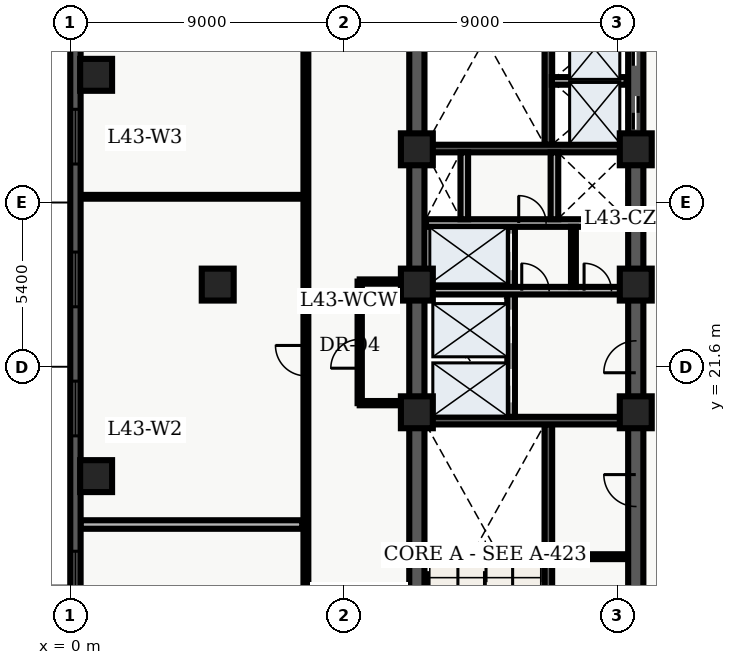
"""IFC4 building model, lengths in metres.
Left out: names, types, materials, properties, quantities, classifications, styles, units other than length and angle.
Written with IfcOpenShell. Run it as: python <this file> out.ifc"""

import sys

from ifc_helpers import new_model, entity, si_unit, converted_unit, direction, frame, origin_with_axes, origin_2d_with_axis, place, context, subcontext, project, spatial, polyline, rectangle, outline, extrude, element, fill, save


model = new_model("IFC4")
c1 = context("Model", 3, precision=1e-05, world=origin_with_axes(), true_north=direction((0.0, 1.0)))
c2 = subcontext(c1, "Body", "Model", "MODEL_VIEW")
j1 = project(units=[si_unit("LENGTHUNIT", "METRE"), converted_unit("PLANEANGLEUNIT", "DEGREE", entity("IfcPlaneAngleMeasure", 0.017), si_unit("PLANEANGLEUNIT", "RADIAN"), dimensions=[0, 0, 0, 0, 0, 0, 0])], contexts=[c1])
p1 = place(None, origin_with_axes())
s1 = spatial("IfcSite", under=j1, at=p1, CompositionType="ELEMENT")
p2 = place(p1, origin_with_axes())
s2 = spatial("IfcBuilding", under=s1, at=p2, CompositionType="ELEMENT")
p3 = place(p2, frame((0.0, 0.0, 175.8), z_axis=(0.0, 0.0, 1.0), x_axis=(1.0, 0.0, 0.0)))
s3 = spatial("IfcBuildingStorey", under=s2, at=p3, CompositionType="ELEMENT", Elevation=175.8)
p4 = place(p3, frame((11.4, 10.8, 0.0), z_axis=(0.0, 0.0, 1.0), x_axis=(0.0, 1.0, 0.0)))
e1 = element("IfcWall", 1, at=p4, inside=s3, PredefinedType="SHEAR", context=c2, shape_type="SweptSolid", body=[
    extrude(outline(polyline([(0.0, -0.25), (27.0, -0.25), (27.0, 0.25), (0.0, 0.25), (0.0, -0.25)])), origin_with_axes(), (0.0, 0.0, 1.0), 3.66),
])
p5 = place(p3, frame((18.6, 10.8, 0.0), z_axis=(0.0, 0.0, 1.0), x_axis=(0.0, 1.0, 0.0)))
e2 = element("IfcWall", 2, at=p5, inside=s3, PredefinedType="SHEAR", context=c2, shape_type="SweptSolid", body=[
    extrude(outline(polyline([(0.0, -0.25), (13.5, -0.25), (13.5, 0.25), (0.0, 0.25), (0.0, -0.25)])), origin_with_axes(), (0.0, 0.0, 1.0), 3.66),
])
p6 = place(p5, frame((11.125, 0.0, 0.0), z_axis=(0.0, 0.0, 1.0), x_axis=(1.0, 0.0, 0.0)))
e3 = element("IfcOpeningElement", 3, at=p6, cuts=e2, PredefinedType="OPENING", context=c2, shape_type="SweptSolid", body=[
    extrude(rectangle(XDim=1.05, YDim=0.52, at=origin_2d_with_axis()), origin_with_axes(), (0.0, 0.0, 1.0), 2.15),
])
p7 = place(p5, frame((2.425, 0.0, 0.0), z_axis=(0.0, 0.0, 1.0), x_axis=(1.0, 0.0, 0.0)))
e4 = element("IfcOpeningElement", 4, at=p7, cuts=e2, PredefinedType="OPENING", context=c2, shape_type="SweptSolid", body=[
    extrude(rectangle(XDim=1.05, YDim=0.52, at=origin_2d_with_axis()), origin_with_axes(), (0.0, 0.0, 1.0), 2.15),
])
p8 = place(p5, frame((6.725, 0.0, 0.0), z_axis=(0.0, 0.0, 1.0), x_axis=(1.0, 0.0, 0.0)))
e5 = element("IfcOpeningElement", 5, at=p8, cuts=e2, PredefinedType="OPENING", context=c2, shape_type="SweptSolid", body=[
    extrude(rectangle(XDim=1.05, YDim=0.52, at=origin_2d_with_axis()), origin_with_axes(), (0.0, 0.0, 1.0), 2.15),
])
p9 = place(p3, frame((18.6, 24.3, 0.0), z_axis=(0.0, 0.0, 1.0), x_axis=(0.0, 1.0, 0.0)))
e6 = element("IfcWall", 6, at=p9, inside=s3, PredefinedType="SHEAR", context=c2, shape_type="SweptSolid", body=[
    extrude(outline(polyline([(0.0, -0.25), (13.5, -0.25), (13.5, 0.25), (0.0, 0.25), (0.0, -0.25)])), origin_with_axes(), (0.0, 0.0, 1.0), 3.66),
])
p10 = place(p9, frame((5.65, 0.0, 0.0), z_axis=(0.0, 0.0, 1.0), x_axis=(1.0, 0.0, 0.0)))
e7 = element("IfcOpeningElement", 7, at=p10, cuts=e6, PredefinedType="OPENING", context=c2, shape_type="SweptSolid", body=[
    extrude(rectangle(XDim=1.1, YDim=0.52, at=origin_2d_with_axis()), origin_with_axes(), (0.0, 0.0, 1.0), 2.15),
])
p11 = place(p9, frame((7.75, 0.0, 0.0), z_axis=(0.0, 0.0, 1.0), x_axis=(1.0, 0.0, 0.0)))
e8 = element("IfcOpeningElement", 8, at=p11, cuts=e6, PredefinedType="OPENING", context=c2, shape_type="SweptSolid", body=[
    extrude(rectangle(XDim=1.1, YDim=0.52, at=origin_2d_with_axis()), origin_with_axes(), (0.0, 0.0, 1.0), 2.15),
])
p12 = place(p3, frame((15.725, 11.05, 0.0), z_axis=(0.0, 0.0, 1.0), x_axis=(0.0, 1.0, 0.0)))
e9 = element("IfcWall", 9, at=p12, inside=s3, PredefinedType="SHEAR", context=c2, shape_type="SweptSolid", body=[
    extrude(outline(polyline([(0.0, -0.125), (8.65, -0.125), (8.65, 0.125), (0.0, 0.125), (0.0, -0.125)])), origin_with_axes(), (0.0, 0.0, 1.0), 3.66),
])
p13 = place(p3, frame((11.65, 19.825, 0.0), z_axis=(0.0, 0.0, 1.0), x_axis=(1.0, 0.0, 0.0)))
e10 = element("IfcWall", 10, at=p13, inside=s3, PredefinedType="SHEAR", context=c2, shape_type="SweptSolid", body=[
    extrude(outline(polyline([(0.0, -0.125), (6.7, -0.125), (6.7, 0.125), (0.0, 0.125), (0.0, -0.125)])), origin_with_axes(), (0.0, 0.0, 1.0), 3.66),
])
p14 = place(p3, frame((15.725, 28.9, 0.0), z_axis=(0.0, 0.0, 1.0), x_axis=(0.0, 1.0, 0.0)))
e11 = element("IfcWall", 11, at=p14, inside=s3, PredefinedType="SHEAR", context=c2, shape_type="SweptSolid", body=[
    extrude(outline(polyline([(0.0, -0.125), (8.65, -0.125), (8.65, 0.125), (0.0, 0.125), (0.0, -0.125)])), origin_with_axes(), (0.0, 0.0, 1.0), 3.66),
])
p15 = place(p3, frame((11.65, 28.775, 0.0), z_axis=(0.0, 0.0, 1.0), x_axis=(1.0, 0.0, 0.0)))
e12 = element("IfcWall", 12, at=p15, inside=s3, PredefinedType="SHEAR", context=c2, shape_type="SweptSolid", body=[
    extrude(outline(polyline([(0.0, -0.125), (6.7, -0.125), (6.7, 0.125), (0.0, 0.125), (0.0, -0.125)])), origin_with_axes(), (0.0, 0.0, 1.0), 3.66),
])
p16 = place(p3, frame((14.5, 19.95, 0.0), z_axis=(0.0, 0.0, 1.0), x_axis=(0.0, 1.0, 0.0)))
e13 = element("IfcWall", 13, at=p16, inside=s3, PredefinedType="SOLIDWALL", context=c2, shape_type="SweptSolid", body=[
    extrude(outline(polyline([(0.0, -0.125), (6.25, -0.125), (6.25, 0.125), (0.0, 0.125), (0.0, -0.125)])), origin_with_axes(), (0.0, 0.0, 1.0), 2.7),
])
p17 = place(p16, frame((1.025, 0.0, 0.0), z_axis=(0.0, 0.0, 1.0), x_axis=(1.0, 0.0, 0.0)))
e14 = element("IfcOpeningElement", 14, at=p17, cuts=e13, PredefinedType="OPENING", context=c2, shape_type="SweptSolid", body=[
    extrude(rectangle(XDim=1.1, YDim=0.27, at=origin_2d_with_axis()), origin_with_axes(), (0.0, 0.0, 1.0), 2.15),
])
p18 = place(p16, frame((2.975, 0.0, 0.0), z_axis=(0.0, 0.0, 1.0), x_axis=(1.0, 0.0, 0.0)))
e15 = element("IfcOpeningElement", 15, at=p18, cuts=e13, PredefinedType="OPENING", context=c2, shape_type="SweptSolid", body=[
    extrude(rectangle(XDim=1.1, YDim=0.27, at=origin_2d_with_axis()), origin_with_axes(), (0.0, 0.0, 1.0), 2.15),
])
p19 = place(p16, frame((5.425, 0.0, 0.0), z_axis=(0.0, 0.0, 1.0), x_axis=(1.0, 0.0, 0.0)))
e16 = element("IfcOpeningElement", 16, at=p19, cuts=e13, PredefinedType="OPENING", context=c2, shape_type="SweptSolid", body=[
    extrude(rectangle(XDim=1.2, YDim=0.27, at=origin_2d_with_axis()), origin_with_axes(), (0.0, 0.0, 1.0), 2.15),
])
p20 = place(p3, frame((11.7, 24.1, 0.0), z_axis=(0.0, 0.0, 1.0), x_axis=(1.0, 0.0, 0.0)))
e17 = element("IfcWall", 17, at=p20, inside=s3, PredefinedType="SOLIDWALL", context=c2, shape_type="SweptSolid", body=[
    extrude(outline(polyline([(0.0, -0.125), (6.6, -0.125), (6.6, 0.125), (0.0, 0.125), (0.0, -0.125)])), origin_with_axes(), (0.0, 0.0, 1.0), 2.7),
])
p21 = place(p20, frame((3.6, 0.0, 0.0), z_axis=(0.0, 0.0, 1.0), x_axis=(1.0, 0.0, 0.0)))
e18 = element("IfcOpeningElement", 18, at=p21, cuts=e17, PredefinedType="OPENING", context=c2, shape_type="SweptSolid", body=[
    extrude(rectangle(XDim=0.9, YDim=0.27, at=origin_2d_with_axis()), origin_with_axes(), (0.0, 0.0, 1.0), 2.15),
])
p22 = place(p20, frame((5.65, 0.0, 0.0), z_axis=(0.0, 0.0, 1.0), x_axis=(1.0, 0.0, 0.0)))
e19 = element("IfcOpeningElement", 19, at=p22, cuts=e17, PredefinedType="OPENING", context=c2, shape_type="SweptSolid", body=[
    extrude(rectangle(XDim=0.9, YDim=0.27, at=origin_2d_with_axis()), origin_with_axes(), (0.0, 0.0, 1.0), 2.15),
])
p23 = place(p3, frame((11.7, 26.325, 0.0), z_axis=(0.0, 0.0, 1.0), x_axis=(1.0, 0.0, 0.0)))
e20 = element("IfcWall", 20, at=p23, inside=s3, PredefinedType="SOLIDWALL", context=c2, shape_type="SweptSolid", body=[
    extrude(outline(polyline([(0.0, -0.125), (6.6, -0.125), (6.6, 0.125), (0.0, 0.125), (0.0, -0.125)])), origin_with_axes(), (0.0, 0.0, 1.0), 2.7),
])
p24 = place(p23, frame((3.5, 0.0, 0.0), z_axis=(0.0, 0.0, 1.0), x_axis=(1.0, 0.0, 0.0)))
e21 = element("IfcOpeningElement", 21, at=p24, cuts=e20, PredefinedType="OPENING", context=c2, shape_type="SweptSolid", body=[
    extrude(rectangle(XDim=0.9, YDim=0.27, at=origin_2d_with_axis()), origin_with_axes(), (0.0, 0.0, 1.0), 2.15),
])
for number, where, z_axis, x_axis in (
    (22, (12.96, 26.45, 0.0), (0.0, 0.0, 1.0), (0.0, 1.0, 0.0)),
    (23, (15.925, 26.45, 0.0), (0.0, 0.0, 1.0), (0.0, 1.0, 0.0)),
):
    element("IfcWall", number, at=place(p3, frame(where, z_axis=z_axis, x_axis=x_axis)), inside=s3, PredefinedType="SOLIDWALL", context=c2, shape_type="SweptSolid", body=[
        extrude(outline(polyline([(0.0, -0.125), (2.2, -0.125), (2.2, 0.125), (0.0, 0.125), (0.0, -0.125)])), origin_with_axes(), (0.0, 0.0, 1.0), 2.7),
    ])
for number, where, z_axis, x_axis in (
    (24, (11.4, 20.1, 0.0), (0.0, 0.0, 1.0), (1.0, 0.0, 0.0)),
    (25, (11.4, 24.3, 0.0), (0.0, 0.0, 1.0), (1.0, 0.0, 0.0)),
    (26, (11.4, 28.75, 0.0), (0.0, 0.0, 1.0), (1.0, 0.0, 0.0)),
    (27, (18.6, 20.1, 0.0), (0.0, 0.0, 1.0), (1.0, 0.0, 0.0)),
    (28, (18.6, 24.3, 0.0), (0.0, 0.0, 1.0), (1.0, 0.0, 0.0)),
    (29, (18.6, 28.75, 0.0), (0.0, 0.0, 1.0), (1.0, 0.0, 0.0)),
    (30, (4.85, 24.3, 0.0), (0.0, 0.0, 1.0), (1.0, 0.0, 0.0)),
    (31, (0.85, 18.0, 0.0), (0.0, 0.0, 1.0), (1.0, 0.0, 0.0)),
    (32, (0.85, 31.2, 0.0), (0.0, 0.0, 1.0), (1.0, 0.0, 0.0)),
):
    element("IfcColumn", number, at=place(p3, frame(where, z_axis=z_axis, x_axis=x_axis)), inside=s3, PredefinedType="COLUMN", context=c2, shape_type="SweptSolid", body=[
        extrude(rectangle(XDim=1.05, YDim=1.05, at=origin_2d_with_axis()), origin_with_axes(), (0.0, 0.0, 1.0), 3.9),
    ])
p25 = place(p3, frame((16.55, 24.22, 0.0), z_axis=(0.0, 0.0, 1.0), x_axis=(0.0, 1.0, 0.0)))
e33 = element("IfcWall", 33, at=p25, inside=s3, PredefinedType="PARTITIONING", context=c2, shape_type="SweptSolid", body=[
    extrude(outline(polyline([(0.0, -0.08), (1.98, -0.08), (1.98, 0.08), (0.0, 0.08), (0.0, -0.08)])), origin_with_axes(), (0.0, 0.0, 1.0), 2.7),
])
p26 = place(p3, frame((15.84, 15.35, 0.0), z_axis=(0.0, 0.0, 1.0), x_axis=(1.0, 0.0, 0.0)))
e34 = element("IfcWall", 34, at=p26, inside=s3, PredefinedType="PARTITIONING", context=c2, shape_type="SweptSolid", body=[
    extrude(outline(polyline([(0.0, -0.08), (2.46, -0.08), (2.46, 0.08), (0.0, 0.08), (0.0, -0.08)])), origin_with_axes(), (0.0, 0.0, 1.0), 2.7),
])
p27 = place(p3, frame((15.84, 31.0, 0.0), z_axis=(0.0, 0.0, 1.0), x_axis=(1.0, 0.0, 0.0)))
e35 = element("IfcWall", 35, at=p27, inside=s3, PredefinedType="SOLIDWALL", context=c2, shape_type="SweptSolid", body=[
    extrude(outline(polyline([(0.0, -0.125), (2.46, -0.125), (2.46, 0.125), (0.0, 0.125), (0.0, -0.125)])), origin_with_axes(), (0.0, 0.0, 1.0), 2.7),
])
p28 = place(p3, frame((9.52, 20.4, 0.0), z_axis=(0.0, 0.0, 1.0), x_axis=(0.0, 1.0, 0.0)))
e36 = element("IfcWall", 36, at=p28, inside=s3, PredefinedType="PARTITIONING", context=c2, shape_type="SweptSolid", body=[
    extrude(outline(polyline([(0.0, -0.07), (4.0, -0.07), (4.0, 0.07), (0.0, 0.07), (0.0, -0.07)])), origin_with_axes(), (0.0, 0.0, 1.0), 2.7),
])
p29 = place(p28, frame((1.625, 0.0, 0.0), z_axis=(0.0, 0.0, 1.0), x_axis=(1.0, 0.0, 0.0)))
e37 = element("IfcOpeningElement", 37, at=p29, cuts=e36, PredefinedType="OPENING", context=c2, shape_type="SweptSolid", body=[
    extrude(rectangle(XDim=0.95, YDim=0.16, at=origin_2d_with_axis()), origin_with_axes(), (0.0, 0.0, 1.0), 2.15),
])
for number, where, z_axis, x_axis in (
    (38, (9.52, 20.4, 0.0), (0.0, 0.0, 1.0), (1.0, 0.0, 0.0)),
    (39, (9.52, 24.4, 0.0), (0.0, 0.0, 1.0), (1.0, 0.0, 0.0)),
):
    element("IfcWall", number, at=place(p3, frame(where, z_axis=z_axis, x_axis=x_axis)), inside=s3, PredefinedType="PARTITIONING", context=c2, shape_type="SweptSolid", body=[
        extrude(outline(polyline([(0.0, -0.07), (1.58, -0.07), (1.58, 0.07), (0.0, 0.07), (0.0, -0.07)])), origin_with_axes(), (0.0, 0.0, 1.0), 2.7),
    ])
p30 = place(p3, frame((7.75, 7.8, 0.0), z_axis=(0.0, 0.0, 1.0), x_axis=(0.0, 1.0, 0.0)))
e40 = element("IfcWall", 40, at=p30, inside=s3, PredefinedType="PARTITIONING", context=c2, shape_type="SweptSolid", body=[
    extrude(outline(polyline([(0.0, -0.08), (32.7, -0.08), (32.7, 0.08), (0.0, 0.08), (0.0, -0.08)])), origin_with_axes(), (0.0, 0.0, 1.0), 2.7),
])
p31 = place(p30, frame((4.369, 0.0, 0.0), z_axis=(0.0, 0.0, 1.0), x_axis=(1.0, 0.0, 0.0)))
e41 = element("IfcOpeningElement", 41, at=p31, cuts=e40, PredefinedType="OPENING", context=c2, shape_type="SweptSolid", body=[
    extrude(rectangle(XDim=1.0, YDim=0.18, at=origin_2d_with_axis()), origin_with_axes(), (0.0, 0.0, 1.0), 2.15),
])
p32 = place(p30, frame((13.998, 0.0, 0.0), z_axis=(0.0, 0.0, 1.0), x_axis=(1.0, 0.0, 0.0)))
e42 = element("IfcOpeningElement", 42, at=p32, cuts=e40, PredefinedType="OPENING", context=c2, shape_type="SweptSolid", body=[
    extrude(rectangle(XDim=1.0, YDim=0.18, at=origin_2d_with_axis()), origin_with_axes(), (0.0, 0.0, 1.0), 2.15),
])
p33 = place(p30, frame((25.979, 0.0, 0.0), z_axis=(0.0, 0.0, 1.0), x_axis=(1.0, 0.0, 0.0)))
e43 = element("IfcOpeningElement", 43, at=p33, cuts=e40, PredefinedType="OPENING", context=c2, shape_type="SweptSolid", body=[
    extrude(rectangle(XDim=1.0, YDim=0.18, at=origin_2d_with_axis()), origin_with_axes(), (0.0, 0.0, 1.0), 2.15),
])
p34 = place(p3, frame((0.335, 16.408, 0.0), z_axis=(0.0, 0.0, 1.0), x_axis=(1.0, 0.0, 0.0)))
e44 = element("IfcWall", 44, at=p34, inside=s3, PredefinedType="PARTITIONING", context=c2, shape_type="SweptSolid", body=[
    extrude(outline(polyline([(0.0, -0.14), (7.295, -0.14), (7.295, 0.14), (0.0, 0.14), (0.0, -0.14)])), origin_with_axes(), (0.0, 0.0, 1.0), 2.7),
])
p35 = place(p3, frame((0.335, 27.188, 0.0), z_axis=(0.0, 0.0, 1.0), x_axis=(1.0, 0.0, 0.0)))
e45 = element("IfcWall", 45, at=p35, inside=s3, PredefinedType="PARTITIONING", context=c2, shape_type="SweptSolid", body=[
    extrude(outline(polyline([(0.0, -0.062), (7.295, -0.062), (7.295, 0.062), (0.0, 0.062), (0.0, -0.062)])), origin_with_axes(), (0.0, 0.0, 1.0), 2.7),
])
p36 = place(p3, frame((0.17, 2.74, 0.0), z_axis=(0.0, 0.0, 1.0), x_axis=(0.0, 1.0, 0.0)))
e46 = element("IfcWall", 46, at=p36, inside=s3, PredefinedType="SOLIDWALL", context=c2, shape_type="SweptSolid", body=[
    extrude(outline(polyline([(0.0, -0.17), (43.46, -0.17), (43.46, 0.17), (0.0, 0.17), (0.0, -0.17)])), origin_with_axes(), (0.0, 0.0, 1.0), 3.66),
])
p37 = place(p36, frame((2.948, 0.0, 0.45), z_axis=(0.0, 0.0, 1.0), x_axis=(1.0, 0.0, 0.0)))
e47 = element("IfcOpeningElement", 47, at=p37, cuts=e46, PredefinedType="OPENING", context=c2, shape_type="SweptSolid", body=[
    extrude(rectangle(XDim=1.8, YDim=0.36, at=origin_2d_with_axis()), origin_with_axes(), (0.0, 0.0, 1.0), 2.1),
])
p38 = place(p36, frame((11.889, 0.0, 0.45), z_axis=(0.0, 0.0, 1.0), x_axis=(1.0, 0.0, 0.0)))
e48 = element("IfcOpeningElement", 48, at=p38, cuts=e46, PredefinedType="OPENING", context=c2, shape_type="SweptSolid", body=[
    extrude(rectangle(XDim=1.8, YDim=0.36, at=origin_2d_with_axis()), origin_with_axes(), (0.0, 0.0, 1.0), 2.1),
])
p39 = place(p36, frame((17.484, 0.0, 0.45), z_axis=(0.0, 0.0, 1.0), x_axis=(1.0, 0.0, 0.0)))
e49 = element("IfcOpeningElement", 49, at=p39, cuts=e46, PredefinedType="OPENING", context=c2, shape_type="SweptSolid", body=[
    extrude(rectangle(XDim=1.8, YDim=0.36, at=origin_2d_with_axis()), origin_with_axes(), (0.0, 0.0, 1.0), 2.1),
])
p40 = place(p36, frame((21.73, 0.0, 0.45), z_axis=(0.0, 0.0, 1.0), x_axis=(1.0, 0.0, 0.0)))
e50 = element("IfcOpeningElement", 50, at=p40, cuts=e46, PredefinedType="OPENING", context=c2, shape_type="SweptSolid", body=[
    extrude(rectangle(XDim=1.8, YDim=0.36, at=origin_2d_with_axis()), origin_with_axes(), (0.0, 0.0, 1.0), 2.1),
])
p41 = place(p36, frame((26.426, 0.0, 0.45), z_axis=(0.0, 0.0, 1.0), x_axis=(1.0, 0.0, 0.0)))
e51 = element("IfcOpeningElement", 51, at=p41, cuts=e46, PredefinedType="OPENING", context=c2, shape_type="SweptSolid", body=[
    extrude(rectangle(XDim=1.8, YDim=0.36, at=origin_2d_with_axis()), origin_with_axes(), (0.0, 0.0, 1.0), 2.1),
])
p42 = place(p36, frame((31.121, 0.0, 0.45), z_axis=(0.0, 0.0, 1.0), x_axis=(1.0, 0.0, 0.0)))
e52 = element("IfcOpeningElement", 52, at=p42, cuts=e46, PredefinedType="OPENING", context=c2, shape_type="SweptSolid", body=[
    extrude(rectangle(XDim=1.8, YDim=0.36, at=origin_2d_with_axis()), origin_with_axes(), (0.0, 0.0, 1.0), 2.1),
])
p43 = place(p36, frame((40.062, 0.0, 0.45), z_axis=(0.0, 0.0, 1.0), x_axis=(1.0, 0.0, 0.0)))
e53 = element("IfcOpeningElement", 53, at=p43, cuts=e46, PredefinedType="OPENING", context=c2, shape_type="SweptSolid", body=[
    extrude(rectangle(XDim=1.8, YDim=0.36, at=origin_2d_with_axis()), origin_with_axes(), (0.0, 0.0, 1.0), 2.1),
])
p44 = place(p9, frame((5.65, 0.0, 0.0), z_axis=(0.0, 0.0, 1.0), x_axis=(1.0, 0.0, 0.0)))
e54 = element("IfcDoor", 54, at=p44, inside=s3, OperationType="SLIDING_TO_LEFT", PredefinedType="DOOR", context=c2, shape_type="SweptSolid", body=[
    extrude(rectangle(XDim=1.1, YDim=0.09, at=origin_2d_with_axis()), origin_with_axes(), (0.0, 0.0, 1.0), 2.15),
])
fill(e7, e54)
p45 = place(p9, frame((7.75, 0.0, 0.0), z_axis=(0.0, 0.0, 1.0), x_axis=(1.0, 0.0, 0.0)))
e55 = element("IfcDoor", 55, at=p45, inside=s3, OperationType="SLIDING_TO_RIGHT", PredefinedType="DOOR", context=c2, shape_type="SweptSolid", body=[
    extrude(rectangle(XDim=1.1, YDim=0.09, at=origin_2d_with_axis()), origin_with_axes(), (0.0, 0.0, 1.0), 2.15),
])
fill(e8, e55)
p46 = place(p16, frame((1.025, 0.0, 0.0), z_axis=(0.0, 0.0, 1.0), x_axis=(1.0, 0.0, 0.0)))
e56 = element("IfcDoor", 56, at=p46, inside=s3, OperationType="SLIDING_TO_LEFT", PredefinedType="DOOR", context=c2, shape_type="SweptSolid", body=[
    extrude(rectangle(XDim=1.1, YDim=0.09, at=origin_2d_with_axis()), origin_with_axes(), (0.0, 0.0, 1.0), 2.15),
])
fill(e14, e56)
p47 = place(p16, frame((2.975, 0.0, 0.0), z_axis=(0.0, 0.0, 1.0), x_axis=(1.0, 0.0, 0.0)))
e57 = element("IfcDoor", 57, at=p47, inside=s3, OperationType="SLIDING_TO_RIGHT", PredefinedType="DOOR", context=c2, shape_type="SweptSolid", body=[
    extrude(rectangle(XDim=1.1, YDim=0.09, at=origin_2d_with_axis()), origin_with_axes(), (0.0, 0.0, 1.0), 2.15),
])
fill(e15, e57)
p48 = place(p16, frame((5.425, 0.0, 0.0), z_axis=(0.0, 0.0, 1.0), x_axis=(1.0, 0.0, 0.0)))
e58 = element("IfcDoor", 58, at=p48, inside=s3, OperationType="DOUBLE_DOOR_SLIDING", PredefinedType="DOOR", context=c2, shape_type="SweptSolid", body=[
    extrude(rectangle(XDim=1.2, YDim=0.09, at=origin_2d_with_axis()), origin_with_axes(), (0.0, 0.0, 1.0), 2.15),
])
fill(e16, e58)
p49 = place(p5, frame((11.125, 0.0, 0.0), z_axis=(0.0, 0.0, 1.0), x_axis=(1.0, 0.0, 0.0)))
e59 = element("IfcDoor", 59, at=p49, inside=s3, OperationType="SINGLE_SWING_LEFT", PredefinedType="DOOR", context=c2, shape_type="SweptSolid", body=[
    extrude(rectangle(XDim=1.05, YDim=0.09, at=origin_2d_with_axis()), origin_with_axes(), (0.0, 0.0, 1.0), 2.15),
])
fill(e3, e59)
p50 = place(p20, frame((3.6, 0.0, 0.0), z_axis=(0.0, 0.0, 1.0), x_axis=(1.0, 0.0, 0.0)))
e60 = element("IfcDoor", 60, at=p50, inside=s3, OperationType="SINGLE_SWING_LEFT", PredefinedType="DOOR", context=c2, shape_type="SweptSolid", body=[
    extrude(rectangle(XDim=0.9, YDim=0.09, at=origin_2d_with_axis()), origin_with_axes(), (0.0, 0.0, 1.0), 2.15),
])
fill(e18, e60)
p51 = place(p20, frame((5.65, 0.0, 0.0), z_axis=(0.0, 0.0, 1.0), x_axis=(1.0, 0.0, 0.0)))
e61 = element("IfcDoor", 61, at=p51, inside=s3, OperationType="SINGLE_SWING_LEFT", PredefinedType="DOOR", context=c2, shape_type="SweptSolid", body=[
    extrude(rectangle(XDim=0.9, YDim=0.09, at=origin_2d_with_axis()), origin_with_axes(), (0.0, 0.0, 1.0), 2.15),
])
fill(e19, e61)
p52 = place(p23, frame((3.5, 0.0, 0.0), z_axis=(0.0, 0.0, 1.0), x_axis=(1.0, 0.0, 0.0)))
e62 = element("IfcDoor", 62, at=p52, inside=s3, OperationType="SINGLE_SWING_LEFT", PredefinedType="DOOR", context=c2, shape_type="SweptSolid", body=[
    extrude(rectangle(XDim=0.9, YDim=0.09, at=origin_2d_with_axis()), origin_with_axes(), (0.0, 0.0, 1.0), 2.15),
])
fill(e21, e62)
p53 = place(p5, frame((6.725, 0.0, 0.0), z_axis=(0.0, 0.0, 1.0), x_axis=(1.0, 0.0, 0.0)))
e63 = element("IfcDoor", 63, at=p53, inside=s3, OperationType="SINGLE_SWING_RIGHT", PredefinedType="DOOR", context=c2, shape_type="SweptSolid", body=[
    extrude(rectangle(XDim=1.05, YDim=0.09, at=origin_2d_with_axis()), origin_with_axes(), (0.0, 0.0, 1.0), 2.15),
])
fill(e5, e63)
p54 = place(p28, frame((1.625, 0.0, 0.0), z_axis=(0.0, 0.0, 1.0), x_axis=(1.0, 0.0, 0.0)))
e64 = element("IfcDoor", 64, at=p54, inside=s3, OperationType="SINGLE_SWING_LEFT", PredefinedType="DOOR", context=c2, shape_type="SweptSolid", body=[
    extrude(rectangle(XDim=0.95, YDim=0.084, at=origin_2d_with_axis()), origin_with_axes(), (0.0, 0.0, 1.0), 2.15),
])
fill(e37, e64)
p55 = place(p30, frame((13.998, 0.0, 0.0), z_axis=(0.0, 0.0, 1.0), x_axis=(1.0, 0.0, 0.0)))
e65 = element("IfcDoor", 65, at=p55, inside=s3, OperationType="SINGLE_SWING_RIGHT", PredefinedType="DOOR", context=c2, shape_type="SweptSolid", body=[
    extrude(rectangle(XDim=1.0, YDim=0.09, at=origin_2d_with_axis()), origin_with_axes(), (0.0, 0.0, 1.0), 2.15),
])
fill(e42, e65)
p56 = place(p36, frame((11.889, 0.0, 0.45), z_axis=(0.0, 0.0, 1.0), x_axis=(1.0, 0.0, 0.0)))
e66 = element("IfcWindow", 66, at=p56, inside=s3, PredefinedType="WINDOW", context=c2, shape_type="SweptSolid", body=[
    extrude(rectangle(XDim=1.8, YDim=0.09, at=origin_2d_with_axis()), origin_with_axes(), (0.0, 0.0, 1.0), 2.1),
])
fill(e48, e66)
p57 = place(p36, frame((17.484, 0.0, 0.45), z_axis=(0.0, 0.0, 1.0), x_axis=(1.0, 0.0, 0.0)))
e67 = element("IfcWindow", 67, at=p57, inside=s3, PredefinedType="WINDOW", context=c2, shape_type="SweptSolid", body=[
    extrude(rectangle(XDim=1.8, YDim=0.09, at=origin_2d_with_axis()), origin_with_axes(), (0.0, 0.0, 1.0), 2.1),
])
fill(e49, e67)
p58 = place(p36, frame((21.73, 0.0, 0.45), z_axis=(0.0, 0.0, 1.0), x_axis=(1.0, 0.0, 0.0)))
e68 = element("IfcWindow", 68, at=p58, inside=s3, PredefinedType="WINDOW", context=c2, shape_type="SweptSolid", body=[
    extrude(rectangle(XDim=1.8, YDim=0.09, at=origin_2d_with_axis()), origin_with_axes(), (0.0, 0.0, 1.0), 2.1),
])
fill(e50, e68)
p59 = place(p36, frame((26.426, 0.0, 0.45), z_axis=(0.0, 0.0, 1.0), x_axis=(1.0, 0.0, 0.0)))
e69 = element("IfcWindow", 69, at=p59, inside=s3, PredefinedType="WINDOW", context=c2, shape_type="SweptSolid", body=[
    extrude(rectangle(XDim=1.8, YDim=0.09, at=origin_2d_with_axis()), origin_with_axes(), (0.0, 0.0, 1.0), 2.1),
])
fill(e51, e69)
save(model, sys.argv[1])
